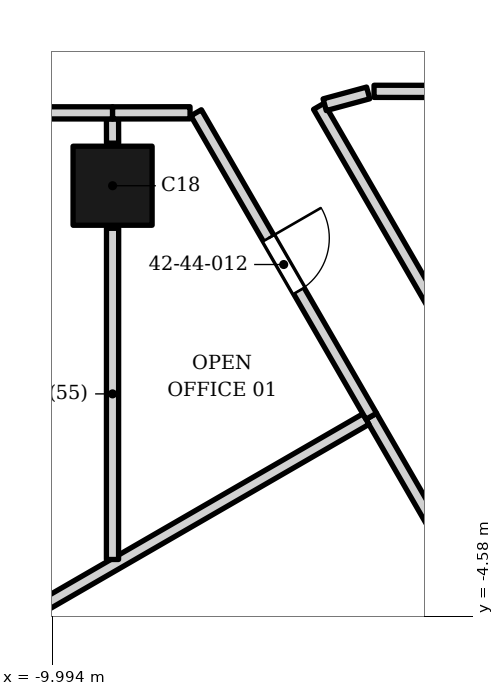
"""IFC4 building model, lengths in metres.
Left out: names, types, materials, properties, quantities, classifications, styles, units other than length and angle.
Written with IfcOpenShell. Run it as: python <this file> out.ifc"""

import sys

from ifc_helpers import new_model, si_unit, direction, frame, frame_2d, origin, origin_2d, place, context, subcontext, project, spatial, rectangle, extrude, element, fill, save


model = new_model("IFC4")
c1 = context("Model", 3, precision=1e-05, world=origin(), true_north=direction((0.0, 1.0)))
c2 = subcontext(c1, "Body", "Model", "MODEL_VIEW")
j1 = project(units=[si_unit("LENGTHUNIT", "METRE"), si_unit("PLANEANGLEUNIT", "RADIAN")], contexts=[c1])
p1 = place(None, origin())
s1 = spatial("IfcSite", under=j1, at=p1, CompositionType="ELEMENT")
p2 = place(p1, origin())
s2 = spatial("IfcBuilding", under=s1, at=p2, CompositionType="ELEMENT")
p3 = place(p2, frame((0.0, 0.0, 179.7)))
s3 = spatial("IfcBuildingStorey", under=s2, at=p3, CompositionType="ELEMENT", Elevation=179.7)
p4 = place(p3, frame((-9.0, 2.5, 0.0), z_axis=(0.0, 0.0, 1.0), x_axis=(1.0, 0.0, 0.0)))
e1 = element("IfcColumn", 1, at=p4, inside=s3, PredefinedType="COLUMN", context=c2, shape_type="SweptSolid", body=[
    extrude(rectangle(XDim=1.3, YDim=1.3, at=origin_2d()), origin(), (0.0, 0.0, 1.0), 3.9),
])
p5 = place(p3, frame((-4.746, -1.292, 0.0), z_axis=(0.0, 0.0, 1.0), x_axis=(0.5000018851, -0.866024315419, 0.0)))
e2 = element("IfcWall", 2, at=p5, inside=s3, PredefinedType="PARTITIONING", context=c2, shape_type="SweptSolid", body=[
    extrude(rectangle(XDim=9.0, YDim=0.2, at=frame_2d((4.5, 0.0))), origin(), (0.0, 0.0, 1.0), 2.742),
])
p6 = place(p5, frame((4.0, 0.0, 0.0)))
e3 = element("IfcOpeningElement", 3, at=p6, cuts=e2, PredefinedType="OPENING", context=c2, shape_type="SweptSolid", body=[
    extrude(rectangle(XDim=1.0, YDim=2.1, at=frame_2d((0.5, 1.05))), frame((0.0, 0.11, 0.0), z_axis=(0.0, -1.0, 0.0), x_axis=(1.0, 0.0, 0.0)), (0.0, 0.0, 1.0), 0.22),
])
p7 = place(p5, frame((7.502, 0.0, 0.0)))
e4 = element("IfcOpeningElement", 4, at=p7, cuts=e2, PredefinedType="OPENING", context=c2, shape_type="SweptSolid", body=[
    extrude(rectangle(XDim=1.0, YDim=2.1, at=frame_2d((0.5, 1.05))), frame((0.0, 0.11, 0.0), z_axis=(0.0, -1.0, 0.0), x_axis=(1.0, 0.0, 0.0)), (0.0, 0.0, 1.0), 0.22),
])
p8 = place(p3, frame((-11.63, -5.265, 0.0), z_axis=(0.0, 0.0, 1.0), x_axis=(0.865784523432, 0.500416985109, 0.0)))
e5 = element("IfcWall", 5, at=p8, inside=s3, PredefinedType="PARTITIONING", context=c2, shape_type="SweptSolid", body=[
    extrude(rectangle(XDim=7.849, YDim=0.2, at=frame_2d((3.925, 0.0))), origin(), (0.0, 0.0, 1.0), 2.742),
])
p9 = place(p3, frame((-9.002, -3.646, 0.0), z_axis=(0.0, 0.0, 1.0), x_axis=(0.000268949741, 0.999999963833, 0.0)))
e6 = element("IfcWall", 6, at=p9, inside=s3, PredefinedType="PARTITIONING", context=c2, shape_type="SweptSolid", body=[
    extrude(rectangle(XDim=5.447, YDim=0.2, at=frame_2d((2.723, 0.0))), origin(), (0.0, 0.0, 1.0), 2.884),
])
p10 = place(p3, frame((-7.626, 3.699, 0.0), z_axis=(0.0, 0.0, 1.0), x_axis=(0.499998744741, -0.866026128507, 0.0)))
e7 = element("IfcWall", 7, at=p10, inside=s3, PredefinedType="PARTITIONING", context=c2, shape_type="SweptSolid", body=[
    extrude(rectangle(XDim=5.762, YDim=0.2, at=frame_2d((2.881, 0.0))), origin(), (0.0, 0.0, 1.0), 2.742),
])
p11 = place(p10, frame((2.381, 0.0, 0.0)))
e8 = element("IfcOpeningElement", 8, at=p11, cuts=e7, PredefinedType="OPENING", context=c2, shape_type="SweptSolid", body=[
    extrude(rectangle(XDim=1.0, YDim=2.1, at=frame_2d((0.5, 1.05))), frame((0.0, 0.11, 0.0), z_axis=(0.0, -1.0, 0.0), x_axis=(1.0, 0.0, 0.0)), (0.0, 0.0, 1.0), 0.22),
])
p12 = place(p3, frame((-9.002, 3.6, 0.0), z_axis=(0.0, 0.0, 1.0), x_axis=(0.003665216676, -0.999993283071, 0.0)))
e9 = element("IfcWall", 9, at=p12, inside=s3, PredefinedType="PARTITIONING", context=c2, shape_type="SweptSolid", body=[
    extrude(rectangle(XDim=0.4, YDim=0.2, at=frame_2d((0.2, 0.0))), origin(), (0.0, 0.0, 1.0), 3.332),
])
p13 = place(p3, frame((-14.4, 3.699, 0.0), z_axis=(0.0, 0.0, 1.0), x_axis=(0.999999963202, -0.000271284522, 0.0)))
e10 = element("IfcWall", 10, at=p13, inside=s3, PredefinedType="PARTITIONING", context=c2, shape_type="SweptSolid", body=[
    extrude(rectangle(XDim=5.4, YDim=0.2, at=frame_2d((2.7, 0.0))), origin(), (0.0, 0.0, 1.0), 3.73),
])
p14 = place(p3, frame((-9.0, 3.698, 0.0), z_axis=(0.0, 0.0, 1.0), x_axis=(0.999999338651, 0.001150085496, 0.0)))
e11 = element("IfcWall", 11, at=p14, inside=s3, PredefinedType="PARTITIONING", context=c2, shape_type="SweptSolid", body=[
    extrude(rectangle(XDim=1.274, YDim=0.2, at=frame_2d((0.637, 0.0))), origin(), (0.0, 0.0, 1.0), 3.73),
])
p15 = place(p3, frame((-5.608, 3.806, 0.0), z_axis=(0.0, 0.0, 1.0), x_axis=(0.500189366784, -0.865916045212, 0.0)))
e12 = element("IfcWall", 12, at=p15, inside=s3, PredefinedType="PARTITIONING", context=c2, shape_type="SweptSolid", body=[
    extrude(rectangle(XDim=8.252, YDim=0.2, at=frame_2d((4.126, 0.0))), origin(), (0.0, 0.0, 1.0), 2.742),
])
p16 = place(p15, frame((3.625, 0.0, 0.0)))
e13 = element("IfcOpeningElement", 13, at=p16, cuts=e12, PredefinedType="OPENING", context=c2, shape_type="SweptSolid", body=[
    extrude(rectangle(XDim=1.0, YDim=2.4, at=frame_2d((0.5, 1.2))), frame((0.0, 0.11, 0.0), z_axis=(0.0, -1.0, 0.0), x_axis=(1.0, 0.0, 0.0)), (0.0, 0.0, 1.0), 0.22),
])
p17 = place(p3, frame((-5.512, 3.832, 0.0), z_axis=(0.0, 0.0, 1.0), x_axis=(0.965127638193, 0.261779758568, 0.0)))
e14 = element("IfcWall", 14, at=p17, inside=s3, PredefinedType="PARTITIONING", context=c2, shape_type="SweptSolid", body=[
    extrude(rectangle(XDim=0.741, YDim=0.2, at=frame_2d((0.371, 0.0))), origin(), (0.0, 0.0, 1.0), 3.73),
])
p18 = place(p3, frame((-4.7, 4.052, 0.0), z_axis=(0.0, 0.0, 1.0), x_axis=(0.999998982503, -0.001426532072, 0.0)))
e15 = element("IfcWall", 15, at=p18, inside=s3, PredefinedType="PARTITIONING", context=c2, shape_type="SweptSolid", body=[
    extrude(rectangle(XDim=1.198, YDim=0.2, at=frame_2d((0.599, 0.0))), origin(), (0.0, 0.0, 1.0), 3.73),
])
p19 = place(p11, origin())
e16 = element("IfcDoor", 16, at=p19, inside=s3, OperationType="SINGLE_SWING_LEFT", PredefinedType="DOOR", context=c2, shape_type="SweptSolid", body=[
    extrude(rectangle(XDim=1.0, YDim=2.1, at=frame_2d((0.5, 1.05))), frame((0.0, 0.025, 0.0), z_axis=(0.0, -1.0, 0.0), x_axis=(1.0, 0.0, 0.0)), (0.0, 0.0, 1.0), 0.05),
])
fill(e8, e16)
save(model, sys.argv[1])
